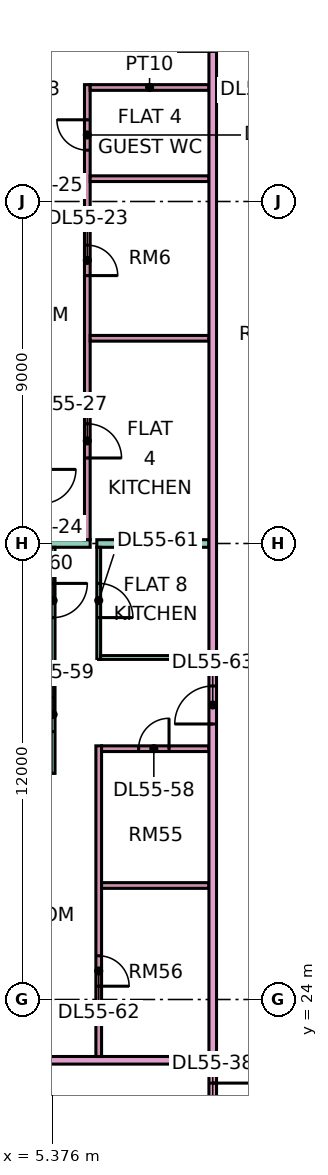
"""IFC4 building model, lengths in metres.
Left out: names, types, materials, properties, quantities, classifications, styles, units other than length and angle.
Written with IfcOpenShell. Run it as: python <this file> out.ifc"""

import sys

from ifc_helpers import new_model, si_unit, direction, frame, frame_2d, origin, place, context, subcontext, project, spatial, rectangle, extrude, element, fill, save


model = new_model("IFC4")
c1 = context("Model", 3, precision=1e-05, world=origin(), true_north=direction((0.0, 1.0)))
c2 = subcontext(c1, "Body", "Model", "MODEL_VIEW")
j1 = project(units=[si_unit("LENGTHUNIT", "METRE"), si_unit("PLANEANGLEUNIT", "RADIAN")], contexts=[c1])
p1 = place(None, origin())
s1 = spatial("IfcSite", under=j1, at=p1, CompositionType="ELEMENT")
p2 = place(p1, origin())
s2 = spatial("IfcBuilding", under=s1, at=p2, CompositionType="ELEMENT")
p3 = place(p2, frame((0.0, 0.0, 234.15)))
s3 = spatial("IfcBuildingStorey", under=s2, at=p3, CompositionType="ELEMENT", Elevation=234.15)
p4 = place(p3, frame((-1.35, 22.4, 0.0), z_axis=(0.0, 0.0, 1.0), x_axis=(1.0, 0.0, 0.0)))
e1 = element("IfcWall", 1, at=p4, inside=s3, PredefinedType="PARTITIONING", context=c2, shape_type="SweptSolid", body=[
    extrude(rectangle(XDim=10.85, YDim=0.2, at=frame_2d((5.425, 0.0))), origin(), (0.0, 0.0, 1.0), 3.35),
])
p5 = place(p3, frame((0.0, 36.0, 0.0), z_axis=(0.0, 0.0, 1.0), x_axis=(1.0, 0.0, 0.0)))
e2 = element("IfcWall", 2, at=p5, inside=s3, PredefinedType="PARTITIONING", context=c2, shape_type="SweptSolid", body=[
    extrude(rectangle(XDim=6.375, YDim=0.2, at=frame_2d((3.188, 0.0))), origin(), (0.0, 0.0, 1.0), 3.35),
])
p6 = place(p3, frame((5.4, 29.95, 0.0), z_axis=(0.0, 0.0, 1.0), x_axis=(0.0, 1.0, 0.0)))
e3 = element("IfcWall", 3, at=p6, inside=s3, PredefinedType="PARTITIONING", context=c2, shape_type="SweptSolid", body=[
    extrude(rectangle(XDim=5.95, YDim=0.1, at=frame_2d((2.975, 0.0))), origin(), (0.0, 0.0, 1.0), 3.35),
])
p7 = place(p6, frame((1.1, 0.0, 0.0)))
e4 = element("IfcOpeningElement", 4, at=p7, cuts=e3, PredefinedType="OPENING", context=c2, shape_type="SweptSolid", body=[
    extrude(rectangle(XDim=0.9, YDim=2.1, at=frame_2d((0.45, 1.05))), frame((0.0, 0.06, 0.0), z_axis=(0.0, -1.0, 0.0), x_axis=(1.0, 0.0, 0.0)), (0.0, 0.0, 1.0), 0.12),
])
p8 = place(p6, frame((4.1, 0.0, 0.0)))
e5 = element("IfcOpeningElement", 5, at=p8, cuts=e3, PredefinedType="OPENING", context=c2, shape_type="SweptSolid", body=[
    extrude(rectangle(XDim=0.9, YDim=2.1, at=frame_2d((0.45, 1.05))), frame((0.0, 0.06, 0.0), z_axis=(0.0, -1.0, 0.0), x_axis=(1.0, 0.0, 0.0)), (0.0, 0.0, 1.0), 0.12),
])
p9 = place(p3, frame((6.3, 36.1, 0.0), z_axis=(0.0, 0.0, 1.0), x_axis=(0.0, 1.0, 0.0)))
e6 = element("IfcWall", 6, at=p9, inside=s3, PredefinedType="PARTITIONING", context=c2, shape_type="SweptSolid", body=[
    extrude(rectangle(XDim=11.975, YDim=0.15, at=frame_2d((5.987, 0.0))), origin(), (0.0, 0.0, 1.0), 3.35),
])
p10 = place(p9, frame((6.95, 0.0, 0.0)))
e7 = element("IfcOpeningElement", 7, at=p10, cuts=e6, PredefinedType="OPENING", context=c2, shape_type="SweptSolid", body=[
    extrude(rectangle(XDim=0.8, YDim=2.1, at=frame_2d((0.4, 1.05))), frame((0.0, 0.085, 0.0), z_axis=(0.0, -1.0, 0.0), x_axis=(1.0, 0.0, 0.0)), (0.0, 0.0, 1.0), 0.17),
])
p11 = place(p9, frame((2.15, 0.0, 0.0)))
e8 = element("IfcOpeningElement", 8, at=p11, cuts=e6, PredefinedType="OPENING", context=c2, shape_type="SweptSolid", body=[
    extrude(rectangle(XDim=0.9, YDim=2.1, at=frame_2d((0.45, 1.05))), frame((0.0, 0.085, 0.0), z_axis=(0.0, -1.0, 0.0), x_axis=(1.0, 0.0, 0.0)), (0.0, 0.0, 1.0), 0.17),
])
p12 = place(p9, frame((10.25, 0.0, 0.0)))
e9 = element("IfcOpeningElement", 9, at=p12, cuts=e6, PredefinedType="OPENING", context=c2, shape_type="SweptSolid", body=[
    extrude(rectangle(XDim=0.8, YDim=2.1, at=frame_2d((0.4, 1.05))), frame((0.0, 0.085, 0.0), z_axis=(0.0, -1.0, 0.0), x_axis=(1.0, 0.0, 0.0)), (0.0, 0.0, 1.0), 0.17),
])
for number, where, z_axis, x_axis in (
    (10, (6.375, 41.4, 0.0), (0.0, 0.0, 1.0), (1.0, 0.0, 0.0)),
    (11, (6.375, 45.6, 0.0), (0.0, 0.0, 1.0), (1.0, 0.0, 0.0)),
    (12, (6.375, 48.0, 0.0), (0.0, 0.0, 1.0), (1.0, 0.0, 0.0)),
):
    element("IfcWall", number, at=place(p3, frame(where, z_axis=z_axis, x_axis=x_axis)), inside=s3, PredefinedType="PARTITIONING", context=c2, shape_type="SweptSolid", body=[
        extrude(rectangle(XDim=3.125, YDim=0.15, at=frame_2d((1.562, 0.0))), origin(), (0.0, 0.0, 1.0), 3.35),
    ])
p13 = place(p3, frame((6.55, 36.0, 0.0), z_axis=(0.0, 0.0, 1.0), x_axis=(1.0, 0.0, 0.0)))
e13 = element("IfcWall", 13, at=p13, inside=s3, PredefinedType="PARTITIONING", context=c2, shape_type="SweptSolid", body=[
    extrude(rectangle(XDim=2.95, YDim=0.2, at=frame_2d((1.475, 0.0))), origin(), (0.0, 0.0, 1.0), 3.35),
])
p14 = place(p3, frame((6.6, 22.5, 0.0), z_axis=(0.0, 0.0, 1.0), x_axis=(0.0, 1.0, 0.0)))
e14 = element("IfcWall", 14, at=p14, inside=s3, PredefinedType="PARTITIONING", context=c2, shape_type="SweptSolid", body=[
    extrude(rectangle(XDim=8.175, YDim=0.15, at=frame_2d((4.087, 0.0))), origin(), (0.0, 0.0, 1.0), 3.35),
])
p15 = place(p14, frame((1.85, 0.0, 0.0)))
e15 = element("IfcOpeningElement", 15, at=p15, cuts=e14, PredefinedType="OPENING", context=c2, shape_type="SweptSolid", body=[
    extrude(rectangle(XDim=0.8, YDim=2.1, at=frame_2d((0.4, 1.05))), frame((0.0, 0.085, 0.0), z_axis=(0.0, -1.0, 0.0), x_axis=(1.0, 0.0, 0.0)), (0.0, 0.0, 1.0), 0.17),
])
p16 = place(p3, frame((6.6, 32.95, 0.0), z_axis=(0.0, 0.0, 1.0), x_axis=(0.0, 1.0, 0.0)))
e16 = element("IfcWall", 16, at=p16, inside=s3, PredefinedType="PARTITIONING", context=c2, shape_type="SweptSolid", body=[
    extrude(rectangle(XDim=2.95, YDim=0.1, at=frame_2d((1.475, 0.0))), origin(), (0.0, 0.0, 1.0), 3.35),
])
p17 = place(p16, frame((1.1, 0.0, 0.0)))
e17 = element("IfcOpeningElement", 17, at=p17, cuts=e16, PredefinedType="OPENING", context=c2, shape_type="SweptSolid", body=[
    extrude(rectangle(XDim=0.9, YDim=2.1, at=frame_2d((0.45, 1.05))), frame((0.0, 0.06, 0.0), z_axis=(0.0, -1.0, 0.0), x_axis=(1.0, 0.0, 0.0)), (0.0, 0.0, 1.0), 0.12),
])
p18 = place(p3, frame((6.65, 33.0, 0.0), z_axis=(0.0, 0.0, 1.0), x_axis=(1.0, 0.0, 0.0)))
e18 = element("IfcWall", 18, at=p18, inside=s3, PredefinedType="PARTITIONING", context=c2, shape_type="SweptSolid", body=[
    extrude(rectangle(XDim=2.85, YDim=0.1, at=frame_2d((1.425, 0.0))), origin(), (0.0, 0.0, 1.0), 3.35),
])
p19 = place(p3, frame((6.675, 27.0, 0.0), z_axis=(0.0, 0.0, 1.0), x_axis=(1.0, 0.0, 0.0)))
e19 = element("IfcWall", 19, at=p19, inside=s3, PredefinedType="PARTITIONING", context=c2, shape_type="SweptSolid", body=[
    extrude(rectangle(XDim=2.825, YDim=0.15, at=frame_2d((1.413, 0.0))), origin(), (0.0, 0.0, 1.0), 3.35),
])
p20 = place(p3, frame((6.675, 30.6, 0.0), z_axis=(0.0, 0.0, 1.0), x_axis=(1.0, 0.0, 0.0)))
e20 = element("IfcWall", 20, at=p20, inside=s3, PredefinedType="PARTITIONING", context=c2, shape_type="SweptSolid", body=[
    extrude(rectangle(XDim=2.825, YDim=0.15, at=frame_2d((1.413, 0.0))), origin(), (0.0, 0.0, 1.0), 3.35),
])
p21 = place(p20, frame((0.975, 0.0, 0.0)))
e21 = element("IfcOpeningElement", 21, at=p21, cuts=e20, PredefinedType="OPENING", context=c2, shape_type="SweptSolid", body=[
    extrude(rectangle(XDim=0.8, YDim=2.1, at=frame_2d((0.4, 1.05))), frame((0.0, 0.085, 0.0), z_axis=(0.0, -1.0, 0.0), x_axis=(1.0, 0.0, 0.0)), (0.0, 0.0, 1.0), 0.17),
])
p22 = place(p3, frame((9.6, 20.0, 0.0), z_axis=(0.0, 0.0, 1.0), x_axis=(0.0, 1.0, 0.0)))
e22 = element("IfcWall", 22, at=p22, inside=s3, PredefinedType="PARTITIONING", context=c2, shape_type="SweptSolid", body=[
    extrude(rectangle(XDim=42.926, YDim=0.2, at=frame_2d((21.463, 0.0))), origin(), (0.0, 0.0, 1.0), 3.35),
])
p23 = place(p22, frame((28.95, 0.0, 0.0)))
e23 = element("IfcOpeningElement", 23, at=p23, cuts=e22, PredefinedType="OPENING", context=c2, shape_type="SweptSolid", body=[
    extrude(rectangle(XDim=1.0, YDim=2.1, at=frame_2d((0.5, 1.05))), frame((0.0, 0.11, 0.0), z_axis=(0.0, -1.0, 0.0), x_axis=(1.0, 0.0, 0.0)), (0.0, 0.0, 1.0), 0.22),
])
p24 = place(p22, frame((31.95, 0.0, 0.0)))
e24 = element("IfcOpeningElement", 24, at=p24, cuts=e22, PredefinedType="OPENING", context=c2, shape_type="SweptSolid", body=[
    extrude(rectangle(XDim=1.0, YDim=2.1, at=frame_2d((0.5, 1.05))), frame((0.0, 0.11, 0.0), z_axis=(0.0, -1.0, 0.0), x_axis=(1.0, 0.0, 0.0)), (0.0, 0.0, 1.0), 0.22),
])
p25 = place(p22, frame((0.6, 0.0, 0.0)))
e25 = element("IfcOpeningElement", 25, at=p25, cuts=e22, PredefinedType="OPENING", context=c2, shape_type="SweptSolid", body=[
    extrude(rectangle(XDim=1.2, YDim=2.1, at=frame_2d((0.6, 1.05))), frame((0.0, 0.11, 0.0), z_axis=(0.0, -1.0, 0.0), x_axis=(1.0, 0.0, 0.0)), (0.0, 0.0, 1.0), 0.22),
])
p26 = place(p22, frame((11.25, 0.0, 0.0)))
e26 = element("IfcOpeningElement", 26, at=p26, cuts=e22, PredefinedType="OPENING", context=c2, shape_type="SweptSolid", body=[
    extrude(rectangle(XDim=1.0, YDim=2.1, at=frame_2d((0.5, 1.05))), frame((0.0, 0.11, 0.0), z_axis=(0.0, -1.0, 0.0), x_axis=(1.0, 0.0, 0.0)), (0.0, 0.0, 1.0), 0.22),
])
p27 = place(p10, frame((0.8, 0.0, 0.0), z_axis=(0.0, 0.0, 1.0), x_axis=(-1.0, 0.0, 0.0)))
e27 = element("IfcDoor", 27, at=p27, inside=s3, OperationType="SINGLE_SWING_LEFT", PredefinedType="DOOR", context=c2, shape_type="SweptSolid", body=[
    extrude(rectangle(XDim=0.8, YDim=2.1, at=frame_2d((0.4, 1.05))), frame((0.0, 0.025, 0.0), z_axis=(0.0, -1.0, 0.0), x_axis=(1.0, 0.0, 0.0)), (0.0, 0.0, 1.0), 0.05),
])
fill(e7, e27)
p28 = place(p11, frame((0.9, 0.0, 0.0), z_axis=(0.0, 0.0, 1.0), x_axis=(-1.0, 0.0, 0.0)))
e28 = element("IfcDoor", 28, at=p28, inside=s3, OperationType="SINGLE_SWING_LEFT", PredefinedType="DOOR", context=c2, shape_type="SweptSolid", body=[
    extrude(rectangle(XDim=0.9, YDim=2.1, at=frame_2d((0.45, 1.05))), frame((0.0, 0.025, 0.0), z_axis=(0.0, -1.0, 0.0), x_axis=(1.0, 0.0, 0.0)), (0.0, 0.0, 1.0), 0.05),
])
fill(e8, e28)
p29 = place(p12, frame((0.8, 0.0, 0.0), z_axis=(0.0, 0.0, 1.0), x_axis=(-1.0, 0.0, 0.0)))
e29 = element("IfcDoor", 29, at=p29, inside=s3, OperationType="SINGLE_SWING_RIGHT", PredefinedType="DOOR", context=c2, shape_type="SweptSolid", body=[
    extrude(rectangle(XDim=0.8, YDim=2.1, at=frame_2d((0.4, 1.05))), frame((0.0, 0.025, 0.0), z_axis=(0.0, -1.0, 0.0), x_axis=(1.0, 0.0, 0.0)), (0.0, 0.0, 1.0), 0.05),
])
fill(e9, e29)
p30 = place(p25, origin())
e30 = element("IfcDoor", 30, at=p30, inside=s3, OperationType="SINGLE_SWING_RIGHT", PredefinedType="DOOR", context=c2, shape_type="SweptSolid", body=[
    extrude(rectangle(XDim=1.2, YDim=2.1, at=frame_2d((0.6, 1.05))), frame((0.0, 0.025, 0.0), z_axis=(0.0, -1.0, 0.0), x_axis=(1.0, 0.0, 0.0)), (0.0, 0.0, 1.0), 0.05),
])
fill(e25, e30)
p31 = place(p21, frame((0.8, 0.0, 0.0), z_axis=(0.0, 0.0, 1.0), x_axis=(-1.0, 0.0, 0.0)))
e31 = element("IfcDoor", 31, at=p31, inside=s3, OperationType="SINGLE_SWING_RIGHT", PredefinedType="DOOR", context=c2, shape_type="SweptSolid", body=[
    extrude(rectangle(XDim=0.8, YDim=2.1, at=frame_2d((0.4, 1.05))), frame((0.0, 0.025, 0.0), z_axis=(0.0, -1.0, 0.0), x_axis=(1.0, 0.0, 0.0)), (0.0, 0.0, 1.0), 0.05),
])
fill(e21, e31)
p32 = place(p7, origin())
e32 = element("IfcDoor", 32, at=p32, inside=s3, OperationType="SINGLE_SWING_LEFT", PredefinedType="DOOR", context=c2, shape_type="SweptSolid", body=[
    extrude(rectangle(XDim=0.9, YDim=2.1, at=frame_2d((0.45, 1.05))), frame((0.0, 0.025, 0.0), z_axis=(0.0, -1.0, 0.0), x_axis=(1.0, 0.0, 0.0)), (0.0, 0.0, 1.0), 0.05),
])
fill(e4, e32)
p33 = place(p8, origin())
e33 = element("IfcDoor", 33, at=p33, inside=s3, OperationType="SINGLE_SWING_RIGHT", PredefinedType="DOOR", context=c2, shape_type="SweptSolid", body=[
    extrude(rectangle(XDim=0.9, YDim=2.1, at=frame_2d((0.45, 1.05))), frame((0.0, 0.025, 0.0), z_axis=(0.0, -1.0, 0.0), x_axis=(1.0, 0.0, 0.0)), (0.0, 0.0, 1.0), 0.05),
])
fill(e5, e33)
p34 = place(p17, frame((0.9, 0.0, 0.0), z_axis=(0.0, 0.0, 1.0), x_axis=(-1.0, 0.0, 0.0)))
e34 = element("IfcDoor", 34, at=p34, inside=s3, OperationType="SINGLE_SWING_LEFT", PredefinedType="DOOR", context=c2, shape_type="SweptSolid", body=[
    extrude(rectangle(XDim=0.9, YDim=2.1, at=frame_2d((0.45, 1.05))), frame((0.0, 0.025, 0.0), z_axis=(0.0, -1.0, 0.0), x_axis=(1.0, 0.0, 0.0)), (0.0, 0.0, 1.0), 0.05),
])
fill(e17, e34)
p35 = place(p15, frame((0.8, 0.0, 0.0), z_axis=(0.0, 0.0, 1.0), x_axis=(-1.0, 0.0, 0.0)))
e35 = element("IfcDoor", 35, at=p35, inside=s3, OperationType="SINGLE_SWING_LEFT", PredefinedType="DOOR", context=c2, shape_type="SweptSolid", body=[
    extrude(rectangle(XDim=0.8, YDim=2.1, at=frame_2d((0.4, 1.05))), frame((0.0, 0.025, 0.0), z_axis=(0.0, -1.0, 0.0), x_axis=(1.0, 0.0, 0.0)), (0.0, 0.0, 1.0), 0.05),
])
fill(e15, e35)
p36 = place(p26, origin())
e36 = element("IfcDoor", 36, at=p36, inside=s3, OperationType="SINGLE_SWING_LEFT", PredefinedType="DOOR", context=c2, shape_type="SweptSolid", body=[
    extrude(rectangle(XDim=1.0, YDim=2.1, at=frame_2d((0.5, 1.05))), frame((0.0, 0.025, 0.0), z_axis=(0.0, -1.0, 0.0), x_axis=(1.0, 0.0, 0.0)), (0.0, 0.0, 1.0), 0.05),
])
fill(e26, e36)
save(model, sys.argv[1])
